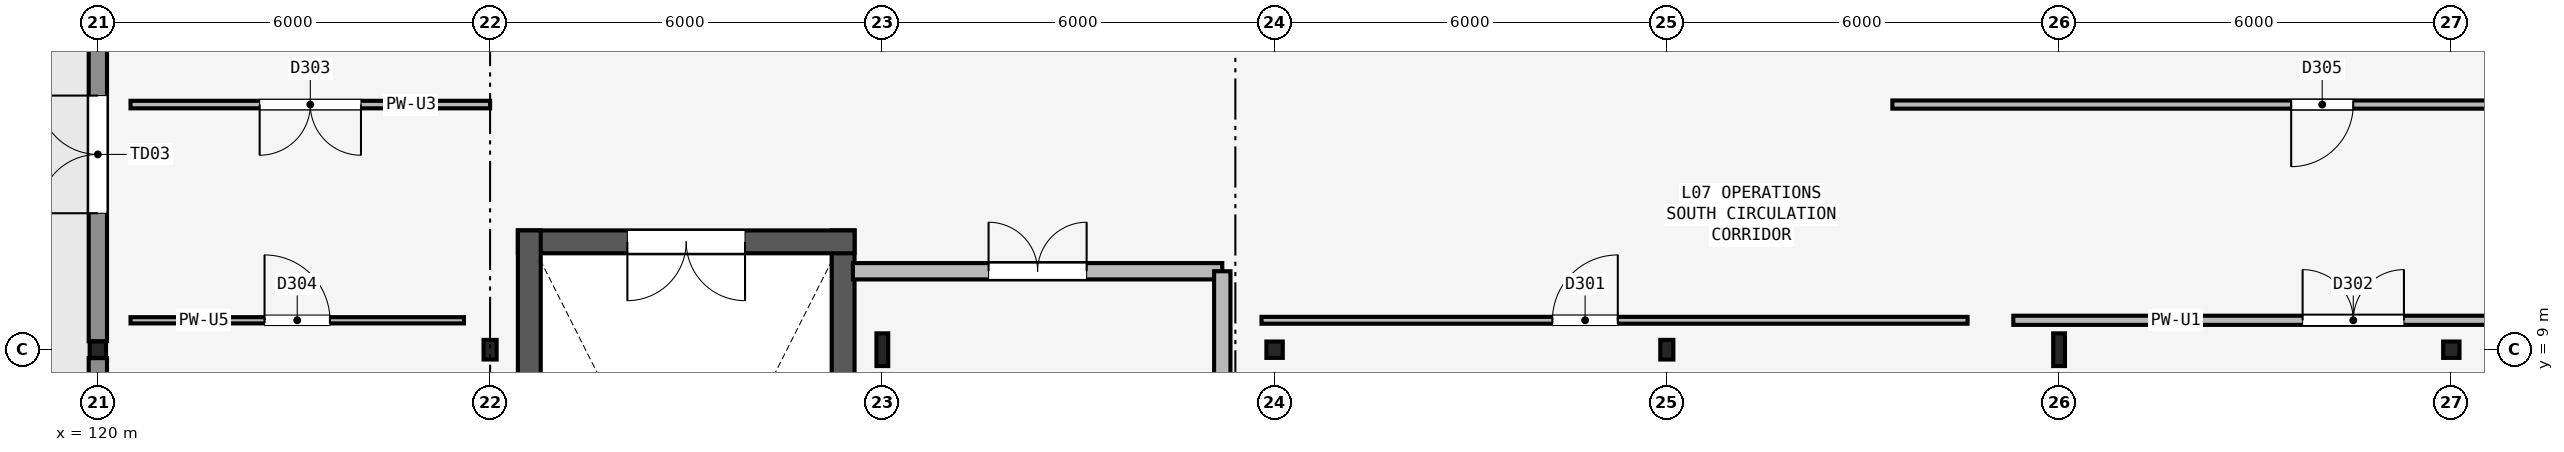
"""IFC4 building model, lengths in metres.
Left out: names, types, materials, properties, quantities, classifications, styles, units other than length and angle.
Written with IfcOpenShell. Run it as: python <this file> out.ifc"""

import sys

from ifc_helpers import new_model, si_unit, direction, frame, frame_2d, origin, origin_2d, place, context, subcontext, project, spatial, rectangle, hollow_rectangle, i_section, extrude, element, fill, save


model = new_model("IFC4")
c1 = context("Model", 3, precision=1e-05, world=origin(), true_north=direction((0.0, 1.0)))
c2 = subcontext(c1, "Body", "Model", "MODEL_VIEW")
j1 = project(units=[si_unit("LENGTHUNIT", "METRE"), si_unit("PLANEANGLEUNIT", "RADIAN")], contexts=[c1])
p1 = place(None, origin())
s1 = spatial("IfcSite", under=j1, at=p1, CompositionType="ELEMENT")
p2 = place(p1, origin())
s2 = spatial("IfcBuilding", under=s1, at=p2, CompositionType="ELEMENT")
p3 = place(p2, frame((0.0, 0.0, 30.0)))
s3 = spatial("IfcBuildingStorey", under=s2, at=p3, CompositionType="ELEMENT", Elevation=30.0)
p4 = place(p3, frame((120.0, 9.0, 0.0), z_axis=(0.0, 0.0, 1.0), x_axis=(1.0, 0.0, 0.0)))
e1 = element("IfcColumn", 1, at=p4, inside=s3, PredefinedType="COLUMN", context=c2, shape_type="SweptSolid", body=[
    extrude(hollow_rectangle(XDim=0.25, YDim=0.25, WallThickness=0.012, InnerFilletRadius=0.012, OuterFilletRadius=0.024, at=origin_2d()), origin(), (0.0, 0.0, 1.0), 4.2),
])
p5 = place(p3, frame((126.0, 9.0, 0.0), z_axis=(0.0, 0.0, 1.0), x_axis=(1.0, 0.0, 0.0)))
e2 = element("IfcColumn", 2, at=p5, inside=s3, PredefinedType="COLUMN", context=c2, shape_type="SweptSolid", body=[
    extrude(hollow_rectangle(XDim=0.2, YDim=0.3, WallThickness=0.012, InnerFilletRadius=0.012, OuterFilletRadius=0.024, at=origin_2d()), origin(), (0.0, 0.0, 1.0), 4.2),
])
p6 = place(p3, frame((132.0, 9.0, 0.0), z_axis=(0.0, 0.0, 1.0), x_axis=(1.0, 0.0, 0.0)))
e3 = element("IfcColumn", 3, at=p6, inside=s3, PredefinedType="COLUMN", context=c2, shape_type="SweptSolid", body=[
    extrude(i_section(OverallWidth=0.18, OverallDepth=0.5, WebThickness=0.01, FlangeThickness=0.017, FilletRadius=0.017, at=origin_2d()), origin(), (0.0, 0.0, 1.0), 4.2),
])
p7 = place(p3, frame((138.0, 9.0, 0.0), z_axis=(0.0, 0.0, 1.0), x_axis=(1.0, 0.0, 0.0)))
e4 = element("IfcColumn", 4, at=p7, inside=s3, PredefinedType="COLUMN", context=c2, shape_type="SweptSolid", body=[
    extrude(hollow_rectangle(XDim=0.25, YDim=0.25, WallThickness=0.012, InnerFilletRadius=0.012, OuterFilletRadius=0.024, at=origin_2d()), origin(), (0.0, 0.0, 1.0), 4.2),
])
p8 = place(p3, frame((144.0, 9.0, 0.0), z_axis=(0.0, 0.0, 1.0), x_axis=(1.0, 0.0, 0.0)))
e5 = element("IfcColumn", 5, at=p8, inside=s3, PredefinedType="COLUMN", context=c2, shape_type="SweptSolid", body=[
    extrude(hollow_rectangle(XDim=0.2, YDim=0.3, WallThickness=0.012, InnerFilletRadius=0.012, OuterFilletRadius=0.024, at=origin_2d()), origin(), (0.0, 0.0, 1.0), 4.2),
])
p9 = place(p3, frame((150.0, 9.0, 0.0), z_axis=(0.0, 0.0, 1.0), x_axis=(1.0, 0.0, 0.0)))
e6 = element("IfcColumn", 6, at=p9, inside=s3, PredefinedType="COLUMN", context=c2, shape_type="SweptSolid", body=[
    extrude(i_section(OverallWidth=0.18, OverallDepth=0.5, WebThickness=0.01, FlangeThickness=0.017, FilletRadius=0.017, at=origin_2d()), origin(), (0.0, 0.0, 1.0), 4.2),
])
p10 = place(p3, frame((156.0, 9.0, 0.0), z_axis=(0.0, 0.0, 1.0), x_axis=(1.0, 0.0, 0.0)))
e7 = element("IfcColumn", 7, at=p10, inside=s3, PredefinedType="COLUMN", context=c2, shape_type="SweptSolid", body=[
    extrude(hollow_rectangle(XDim=0.25, YDim=0.25, WallThickness=0.012, InnerFilletRadius=0.012, OuterFilletRadius=0.024, at=origin_2d()), origin(), (0.0, 0.0, 1.0), 4.2),
])
p11 = place(p3, frame((120.0, 6.8, 0.0), z_axis=(0.0, 0.0, 1.0), x_axis=(0.0, 1.0, 0.0)))
e8 = element("IfcWall", 8, at=p11, inside=s3, PredefinedType="SOLIDWALL", context=c2, shape_type="SweptSolid", body=[
    extrude(rectangle(XDim=2.071, YDim=0.28, at=frame_2d((1.036, 0.0))), origin(), (0.0, 0.0, 1.0), 3.58),
])
p12 = place(p3, frame((120.0, 9.129, 0.0), z_axis=(0.0, 0.0, 1.0), x_axis=(0.0, 1.0, 0.0)))
e9 = element("IfcWall", 9, at=p12, inside=s3, PredefinedType="SOLIDWALL", context=c2, shape_type="SweptSolid", body=[
    extrude(rectangle(XDim=5.717, YDim=0.28, at=frame_2d((2.858, 0.0))), origin(), (0.0, 0.0, 1.0), 3.58),
])
p13 = place(p12, frame((1.958, 0.0, 0.0)))
e10 = element("IfcOpeningElement", 10, at=p13, cuts=e9, PredefinedType="OPENING", context=c2, shape_type="SweptSolid", body=[
    extrude(rectangle(XDim=1.8, YDim=2.3, at=frame_2d((0.9, 1.15))), frame((0.0, 0.15, 0.0), z_axis=(0.0, -1.0, 0.0), x_axis=(1.0, 0.0, 0.0)), (0.0, 0.0, 1.0), 0.3),
])
p14 = place(p3, frame((131.4, 1.075, 0.0), z_axis=(0.0, 0.0, 1.0), x_axis=(0.0, 1.0, 0.0)))
e11 = element("IfcWall", 11, at=p14, inside=s3, PredefinedType="SHEAR", context=c2, shape_type="SweptSolid", body=[
    extrude(rectangle(XDim=9.75, YDim=0.35, at=frame_2d((4.875, 0.0))), origin(), (0.0, 0.0, 1.0), 4.06),
])
p15 = place(p3, frame((131.575, 10.65, 0.0), z_axis=(0.0, 0.0, 1.0), x_axis=(-1.0, 0.0, 0.0)))
e12 = element("IfcWall", 12, at=p15, inside=s3, PredefinedType="SHEAR", context=c2, shape_type="SweptSolid", body=[
    extrude(rectangle(XDim=5.15, YDim=0.35, at=frame_2d((2.575, 0.0))), origin(), (0.0, 0.0, 1.0), 4.06),
])
p16 = place(p15, frame((1.675, 0.0, 0.0)))
e13 = element("IfcOpeningElement", 13, at=p16, cuts=e12, PredefinedType="OPENING", context=c2, shape_type="SweptSolid", body=[
    extrude(rectangle(XDim=1.8, YDim=2.2, at=frame_2d((0.9, 1.1))), frame((0.0, 0.185, 0.0), z_axis=(0.0, -1.0, 0.0), x_axis=(1.0, 0.0, 0.0)), (0.0, 0.0, 1.0), 0.37),
])
p17 = place(p3, frame((126.6, 10.825, 0.0), z_axis=(0.0, 0.0, 1.0), x_axis=(0.0, -1.0, 0.0)))
e14 = element("IfcWall", 14, at=p17, inside=s3, PredefinedType="SHEAR", context=c2, shape_type="SweptSolid", body=[
    extrude(rectangle(XDim=9.75, YDim=0.35, at=frame_2d((4.875, 0.0))), origin(), (0.0, 0.0, 1.0), 4.06),
])
p18 = place(p3, frame((131.55, 10.2, 0.0), z_axis=(0.0, 0.0, 1.0), x_axis=(1.0, 0.0, 0.0)))
e15 = element("IfcWall", 15, at=p18, inside=s3, PredefinedType="PARTITIONING", context=c2, shape_type="SweptSolid", body=[
    extrude(rectangle(XDim=5.65, YDim=0.25, at=frame_2d((2.825, 0.0))), origin(), (0.0, 0.0, 1.0), 3.68),
])
p19 = place(p18, frame((2.075, 0.0, 0.0)))
e16 = element("IfcOpeningElement", 16, at=p19, cuts=e15, PredefinedType="OPENING", context=c2, shape_type="SweptSolid", body=[
    extrude(rectangle(XDim=1.5, YDim=2.15, at=frame_2d((0.75, 1.075))), frame((0.0, 0.135, 0.0), z_axis=(0.0, -1.0, 0.0), x_axis=(1.0, 0.0, 0.0)), (0.0, 0.0, 1.0), 0.27),
])
p20 = place(p3, frame((137.2, 5.8, 0.0), z_axis=(0.0, 0.0, 1.0), x_axis=(0.0, 1.0, 0.0)))
e17 = element("IfcWall", 17, at=p20, inside=s3, PredefinedType="PARTITIONING", context=c2, shape_type="SweptSolid", body=[
    extrude(rectangle(XDim=4.4, YDim=0.25, at=frame_2d((2.2, 0.0))), origin(), (0.0, 0.0, 1.0), 3.43),
])
p21 = place(p3, frame((137.8, 9.45, 0.0), z_axis=(0.0, 0.0, 1.0), x_axis=(1.0, 0.0, 0.0)))
e18 = element("IfcWall", 18, at=p21, inside=s3, PredefinedType="PARTITIONING", context=c2, shape_type="SweptSolid", body=[
    extrude(rectangle(XDim=10.8, YDim=0.105, at=frame_2d((5.4, 0.0))), origin(), (0.0, 0.0, 1.0), 3.63),
])
p22 = place(p21, frame((4.45, 0.0, 0.0)))
e19 = element("IfcOpeningElement", 19, at=p22, cuts=e18, PredefinedType="OPENING", context=c2, shape_type="SweptSolid", body=[
    extrude(rectangle(XDim=1.0, YDim=2.15, at=frame_2d((0.5, 1.075))), frame((0.0, 0.062, 0.0), z_axis=(0.0, -1.0, 0.0), x_axis=(1.0, 0.0, 0.0)), (0.0, 0.0, 1.0), 0.125),
])
p23 = place(p3, frame((149.3, 9.45, 0.0), z_axis=(0.0, 0.0, 1.0), x_axis=(1.0, 0.0, 0.0)))
e20 = element("IfcWall", 20, at=p23, inside=s3, PredefinedType="PARTITIONING", context=c2, shape_type="SweptSolid", body=[
    extrude(rectangle(XDim=11.3, YDim=0.14, at=frame_2d((5.65, 0.0))), origin(), (0.0, 0.0, 1.0), 3.68),
])
p24 = place(p23, frame((4.425, 0.0, 0.0)))
e21 = element("IfcOpeningElement", 21, at=p24, cuts=e20, PredefinedType="OPENING", context=c2, shape_type="SweptSolid", body=[
    extrude(rectangle(XDim=1.55, YDim=2.2, at=frame_2d((0.775, 1.1))), frame((0.0, 0.08, 0.0), z_axis=(0.0, -1.0, 0.0), x_axis=(1.0, 0.0, 0.0)), (0.0, 0.0, 1.0), 0.16),
])
p25 = place(p3, frame((126.0, 12.75, 0.0), z_axis=(0.0, 0.0, 1.0), x_axis=(-1.0, 0.0, 0.0)))
e22 = element("IfcWall", 22, at=p25, inside=s3, PredefinedType="PARTITIONING", context=c2, shape_type="SweptSolid", body=[
    extrude(rectangle(XDim=5.5, YDim=0.115, at=frame_2d((2.75, 0.0))), origin(), (0.0, 0.0, 1.0), 3.706),
])
p26 = place(p25, frame((1.975, 0.0, 0.0)))
e23 = element("IfcOpeningElement", 23, at=p26, cuts=e22, PredefinedType="OPENING", context=c2, shape_type="SweptSolid", body=[
    extrude(rectangle(XDim=1.55, YDim=2.2, at=frame_2d((0.775, 1.1))), frame((0.0, 0.067, 0.0), z_axis=(0.0, -1.0, 0.0), x_axis=(1.0, 0.0, 0.0)), (0.0, 0.0, 1.0), 0.135),
])
p27 = place(p3, frame((120.5, 9.45, 0.0), z_axis=(0.0, 0.0, 1.0), x_axis=(1.0, 0.0, 0.0)))
e24 = element("IfcWall", 24, at=p27, inside=s3, PredefinedType="PARTITIONING", context=c2, shape_type="SweptSolid", body=[
    extrude(rectangle(XDim=5.1, YDim=0.095, at=frame_2d((2.55, 0.0))), origin(), (0.0, 0.0, 1.0), 3.73),
])
p28 = place(p27, frame((2.05, 0.0, 0.0)))
e25 = element("IfcOpeningElement", 25, at=p28, cuts=e24, PredefinedType="OPENING", context=c2, shape_type="SweptSolid", body=[
    extrude(rectangle(XDim=1.0, YDim=2.15, at=frame_2d((0.5, 1.075))), frame((0.0, 0.057, 0.0), z_axis=(0.0, -1.0, 0.0), x_axis=(1.0, 0.0, 0.0)), (0.0, 0.0, 1.0), 0.115),
])
p29 = place(p3, frame((160.6, 12.75, 0.0), z_axis=(0.0, 0.0, 1.0), x_axis=(-1.0, 0.0, 0.0)))
e26 = element("IfcWall", 26, at=p29, inside=s3, PredefinedType="PARTITIONING", context=c2, shape_type="SweptSolid", body=[
    extrude(rectangle(XDim=13.15, YDim=0.125, at=frame_2d((6.575, 0.0))), origin(), (0.0, 0.0, 1.0), 3.68),
])
p30 = place(p29, frame((6.1, 0.0, 0.0)))
e27 = element("IfcOpeningElement", 27, at=p30, cuts=e26, PredefinedType="OPENING", context=c2, shape_type="SweptSolid", body=[
    extrude(rectangle(XDim=0.95, YDim=2.15, at=frame_2d((0.475, 1.075))), frame((0.0, 0.073, 0.0), z_axis=(0.0, -1.0, 0.0), x_axis=(1.0, 0.0, 0.0)), (0.0, 0.0, 1.0), 0.145),
])
p31 = place(p13, origin())
e28 = element("IfcDoor", 28, at=p31, inside=s3, OperationType="DOUBLE_DOOR_SINGLE_SWING", PredefinedType="DOOR", context=c2, shape_type="SweptSolid", body=[
    extrude(rectangle(XDim=1.8, YDim=2.3, at=frame_2d((0.9, 1.15))), frame((0.0, 0.025, 0.0), z_axis=(0.0, -1.0, 0.0), x_axis=(1.0, 0.0, 0.0)), (0.0, 0.0, 1.0), 0.05),
])
fill(e10, e28)
p32 = place(p16, origin())
e29 = element("IfcDoor", 29, at=p32, inside=s3, OperationType="DOUBLE_DOOR_SINGLE_SWING", PredefinedType="DOOR", context=c2, shape_type="SweptSolid", body=[
    extrude(rectangle(XDim=1.8, YDim=2.2, at=frame_2d((0.9, 1.1))), frame((0.0, 0.025, 0.0), z_axis=(0.0, -1.0, 0.0), x_axis=(1.0, 0.0, 0.0)), (0.0, 0.0, 1.0), 0.05),
])
fill(e13, e29)
p33 = place(p19, origin())
e30 = element("IfcDoor", 30, at=p33, inside=s3, OperationType="DOUBLE_DOOR_SINGLE_SWING", PredefinedType="DOOR", context=c2, shape_type="SweptSolid", body=[
    extrude(rectangle(XDim=1.5, YDim=2.15, at=frame_2d((0.75, 1.075))), frame((0.0, 0.025, 0.0), z_axis=(0.0, -1.0, 0.0), x_axis=(1.0, 0.0, 0.0)), (0.0, 0.0, 1.0), 0.05),
])
fill(e16, e30)
p34 = place(p22, origin())
e31 = element("IfcDoor", 31, at=p34, inside=s3, OperationType="SINGLE_SWING_RIGHT", PredefinedType="DOOR", context=c2, shape_type="SweptSolid", body=[
    extrude(rectangle(XDim=1.0, YDim=2.15, at=frame_2d((0.5, 1.075))), frame((0.0, 0.025, 0.0), z_axis=(0.0, -1.0, 0.0), x_axis=(1.0, 0.0, 0.0)), (0.0, 0.0, 1.0), 0.05),
])
fill(e19, e31)
p35 = place(p24, origin())
e32 = element("IfcDoor", 32, at=p35, inside=s3, OperationType="DOUBLE_DOOR_SINGLE_SWING", PredefinedType="DOOR", context=c2, shape_type="SweptSolid", body=[
    extrude(rectangle(XDim=1.55, YDim=2.2, at=frame_2d((0.775, 1.1))), frame((0.0, 0.025, 0.0), z_axis=(0.0, -1.0, 0.0), x_axis=(1.0, 0.0, 0.0)), (0.0, 0.0, 1.0), 0.05),
])
fill(e21, e32)
p36 = place(p26, origin())
e33 = element("IfcDoor", 33, at=p36, inside=s3, OperationType="DOUBLE_DOOR_SINGLE_SWING", PredefinedType="DOOR", context=c2, shape_type="SweptSolid", body=[
    extrude(rectangle(XDim=1.55, YDim=2.2, at=frame_2d((0.775, 1.1))), frame((0.0, 0.025, 0.0), z_axis=(0.0, -1.0, 0.0), x_axis=(1.0, 0.0, 0.0)), (0.0, 0.0, 1.0), 0.05),
])
fill(e23, e33)
p37 = place(p28, origin())
e34 = element("IfcDoor", 34, at=p37, inside=s3, OperationType="SINGLE_SWING_LEFT", PredefinedType="DOOR", context=c2, shape_type="SweptSolid", body=[
    extrude(rectangle(XDim=1.0, YDim=2.15, at=frame_2d((0.5, 1.075))), frame((0.0, 0.025, 0.0), z_axis=(0.0, -1.0, 0.0), x_axis=(1.0, 0.0, 0.0)), (0.0, 0.0, 1.0), 0.05),
])
fill(e25, e34)
p38 = place(p30, origin())
e35 = element("IfcDoor", 35, at=p38, inside=s3, OperationType="SINGLE_SWING_RIGHT", PredefinedType="DOOR", context=c2, shape_type="SweptSolid", body=[
    extrude(rectangle(XDim=0.95, YDim=2.15, at=frame_2d((0.475, 1.075))), frame((0.0, 0.025, 0.0), z_axis=(0.0, -1.0, 0.0), x_axis=(1.0, 0.0, 0.0)), (0.0, 0.0, 1.0), 0.05),
])
fill(e27, e35)
save(model, sys.argv[1])
